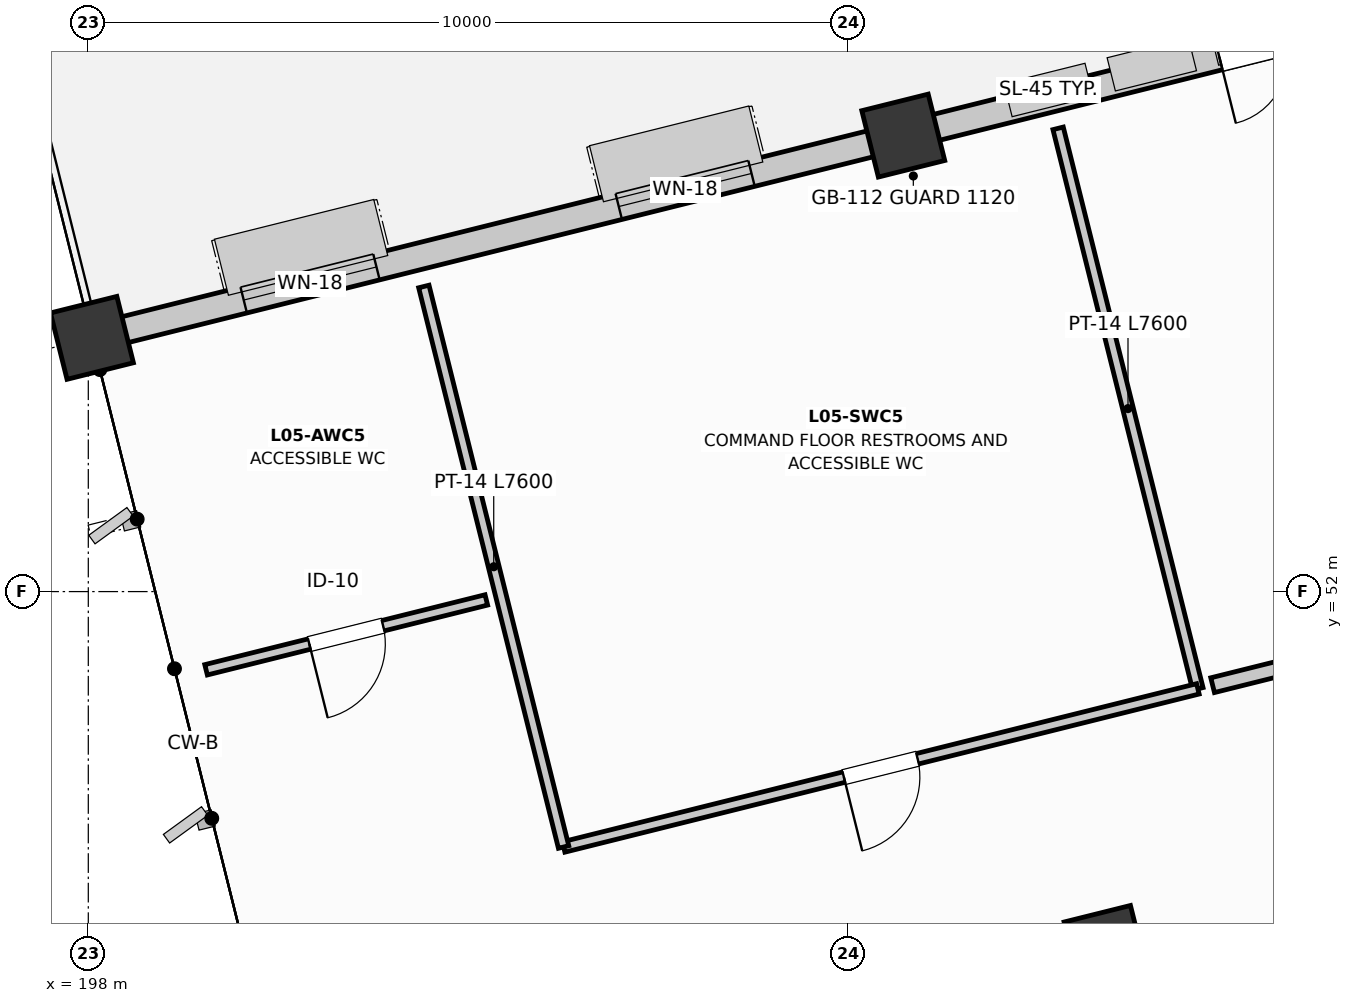
"""IFC4 building model, lengths in metres.
Left out: names, types, materials, properties, quantities, classifications, styles, units other than length and angle.
Written with IfcOpenShell. Run it as: python <this file> out.ifc"""

import sys

from ifc_helpers import new_model, si_unit, direction, frame, frame_2d, origin, origin_2d, place, context, subcontext, project, spatial, rectangle, extrude, element, fill, save


model = new_model("IFC4")
c1 = context("Model", 3, precision=1e-05, world=origin(), true_north=direction((0.0, 1.0)))
c2 = subcontext(c1, "Body", "Model", "MODEL_VIEW")
j1 = project(units=[si_unit("LENGTHUNIT", "METRE"), si_unit("PLANEANGLEUNIT", "RADIAN")], contexts=[c1])
p1 = place(None, origin())
s1 = spatial("IfcSite", under=j1, at=p1, CompositionType="ELEMENT")
p2 = place(p1, origin())
s2 = spatial("IfcBuilding", under=s1, at=p2, CompositionType="ELEMENT")
p3 = place(p2, frame((0.0, 0.0, 24.6)))
s3 = spatial("IfcBuildingStorey", under=s2, at=p3, CompositionType="ELEMENT", Elevation=24.6)
for number, where, z_axis, x_axis in (
    (1, (198.048, 55.338, 0.0), (0.0, 0.0, 1.0), (0.97, 0.242, 0.0)),
    (2, (211.383, 47.325, 0.0), (0.0, 0.0, 1.0), (0.97, 0.242, 0.0)),
    (3, (208.722, 57.999, 0.0), (0.0, 0.0, 1.0), (0.97, 0.242, 0.0)),
):
    element("IfcColumn", number, at=place(p3, frame(where, z_axis=z_axis, x_axis=x_axis)), inside=s3, PredefinedType="COLUMN", context=c2, shape_type="SweptSolid", body=[
        extrude(rectangle(XDim=0.9, YDim=0.9, at=origin_2d()), origin(), (0.0, 0.0, 1.0), 4.2),
    ])
p4 = place(p3, frame((219.089, 60.584, 0.0), z_axis=(0.0, 0.0, 1.0), x_axis=(-0.970295240562, -0.241923843686, 0.0)))
e4 = element("IfcWall", 4, at=p4, inside=s3, PredefinedType="STANDARD", context=c2, shape_type="SweptSolid", body=[
    extrude(rectangle(XDim=10.27, YDim=0.35, at=frame_2d((5.135, 0.0))), origin(), (0.0, 0.0, 1.0), 3.575),
])
p5 = place(p4, frame((4.6, 0.0, 0.0)))
e5 = element("IfcOpeningElement", 5, at=p5, cuts=e4, PredefinedType="OPENING", context=c2, shape_type="SweptSolid", body=[
    extrude(rectangle(XDim=1.8, YDim=2.3, at=frame_2d((0.9, 1.15))), frame((0.0, 0.185, 0.0), z_axis=(0.0, -1.0, 0.0), x_axis=(1.0, 0.0, 0.0)), (0.0, 0.0, 1.0), 0.37),
])
p6 = place(p3, frame((208.319, 57.898, 0.0), z_axis=(0.0, 0.0, 1.0), x_axis=(-0.970296149297, -0.241920198949, 0.0)))
e6 = element("IfcWall", 6, at=p6, inside=s3, PredefinedType="STANDARD", context=c2, shape_type="SweptSolid", body=[
    extrude(rectangle(XDim=10.171, YDim=0.35, at=frame_2d((5.085, 0.0))), origin(), (0.0, 0.0, 1.0), 3.575),
])
p7 = place(p6, frame((1.643, 0.0, 0.85)))
e7 = element("IfcOpeningElement", 7, at=p7, cuts=e6, PredefinedType="OPENING", context=c2, shape_type="SweptSolid", body=[
    extrude(rectangle(XDim=1.8, YDim=1.65, at=frame_2d((0.9, 0.825))), frame((0.0, 0.185, 0.0), z_axis=(0.0, -1.0, 0.0), x_axis=(1.0, 0.0, 0.0)), (0.0, 0.0, 1.0), 0.37),
])
p8 = place(p6, frame((6.728, 0.0, 0.85)))
e8 = element("IfcOpeningElement", 8, at=p8, cuts=e6, PredefinedType="OPENING", context=c2, shape_type="SweptSolid", body=[
    extrude(rectangle(XDim=1.8, YDim=1.65, at=frame_2d((0.9, 0.825))), frame((0.0, 0.185, 0.0), z_axis=(0.0, -1.0, 0.0), x_axis=(1.0, 0.0, 0.0)), (0.0, 0.0, 1.0), 0.37),
])
p9 = place(p3, frame((220.309, 48.727, 0.0), z_axis=(0.0, 0.0, 1.0), x_axis=(-0.970296544738, -0.241918612906, 0.0)))
e9 = element("IfcWall", 9, at=p9, inside=s3, PredefinedType="SHEAR", context=c2, shape_type="SweptSolid", body=[
    extrude(rectangle(XDim=17.2, YDim=0.4, at=frame_2d((8.6, 0.0))), origin(), (0.0, 0.0, 1.0), 3.98),
])
p10 = place(p9, frame((5.32, 0.0, 0.0)))
e10 = element("IfcOpeningElement", 10, at=p10, cuts=e9, PredefinedType="OPENING", context=c2, shape_type="SweptSolid", body=[
    extrude(rectangle(XDim=2.0, YDim=2.3, at=frame_2d((1.0, 1.15))), frame((0.0, 0.21, 0.0), z_axis=(0.0, -1.0, 0.0), x_axis=(1.0, 0.0, 0.0)), (0.0, 0.0, 1.0), 0.42),
])
p11 = place(p3, frame((210.759, 58.094, 0.0), z_axis=(0.0, 0.0, 1.0), x_axis=(0.241922569678, -0.970295558209, 0.0)))
e11 = element("IfcWall", 11, at=p11, inside=s3, PredefinedType="PARTITIONING", context=c2, shape_type="SweptSolid", body=[
    extrude(rectangle(XDim=7.6, YDim=0.14, at=frame_2d((3.8, 0.0))), origin(), (0.0, 0.0, 1.0), 3.98),
])
p12 = place(p3, frame((212.598, 50.72, 0.0), z_axis=(0.0, 0.0, 1.0), x_axis=(-0.970296884994, -0.241917248188, 0.0)))
e12 = element("IfcWall", 12, at=p12, inside=s3, PredefinedType="PARTITIONING", context=c2, shape_type="SweptSolid", body=[
    extrude(rectangle(XDim=8.6, YDim=0.14, at=frame_2d((4.3, 0.0))), origin(), (0.0, 0.0, 1.0), 3.225),
])
p13 = place(p12, frame((3.8, 0.0, 0.0)))
e13 = element("IfcOpeningElement", 13, at=p13, cuts=e12, PredefinedType="OPENING", context=c2, shape_type="SweptSolid", body=[
    extrude(rectangle(XDim=1.0, YDim=2.15, at=frame_2d((0.5, 1.075))), frame((0.0, 0.08, 0.0), z_axis=(0.0, -1.0, 0.0), x_axis=(1.0, 0.0, 0.0)), (0.0, 0.0, 1.0), 0.16),
])
p14 = place(p3, frame((204.253, 48.64, 0.0), z_axis=(0.0, 0.0, 1.0), x_axis=(-0.241922569678, 0.970295558209, 0.0)))
e14 = element("IfcWall", 14, at=p14, inside=s3, PredefinedType="PARTITIONING", context=c2, shape_type="SweptSolid", body=[
    extrude(rectangle(XDim=7.6, YDim=0.14, at=frame_2d((3.8, 0.0))), origin(), (0.0, 0.0, 1.0), 3.98),
])
p15 = place(p3, frame((220.748, 52.752, 0.0), z_axis=(0.0, 0.0, 1.0), x_axis=(-0.97029796636, -0.241912910937, 0.0)))
e15 = element("IfcWall", 15, at=p15, inside=s3, PredefinedType="PARTITIONING", context=c2, shape_type="SweptSolid", body=[
    extrude(rectangle(XDim=8.2, YDim=0.2, at=frame_2d((4.1, 0.0))), origin(), (0.0, 0.0, 1.0), 3.98),
])
p16 = place(p15, frame((3.55, 0.0, 0.0)))
e16 = element("IfcOpeningElement", 16, at=p16, cuts=e15, PredefinedType="OPENING", context=c2, shape_type="SweptSolid", body=[
    extrude(rectangle(XDim=1.1, YDim=2.2, at=frame_2d((0.55, 1.1))), frame((0.0, 0.11, 0.0), z_axis=(0.0, -1.0, 0.0), x_axis=(1.0, 0.0, 0.0)), (0.0, 0.0, 1.0), 0.22),
])
p17 = place(p3, frame((203.237, 51.89, 0.0), z_axis=(0.0, 0.0, 1.0), x_axis=(-0.970295558209, -0.241922569678, 0.0)))
e17 = element("IfcWall", 17, at=p17, inside=s3, PredefinedType="PARTITIONING", context=c2, shape_type="SweptSolid", body=[
    extrude(rectangle(XDim=3.8, YDim=0.14, at=frame_2d((1.9, 0.0))), origin(), (0.0, 0.0, 1.0), 3.98),
])
p18 = place(p17, frame((1.4, 0.0, 0.0)))
e18 = element("IfcOpeningElement", 18, at=p18, cuts=e17, PredefinedType="OPENING", context=c2, shape_type="SweptSolid", body=[
    extrude(rectangle(XDim=1.0, YDim=2.15, at=frame_2d((0.5, 1.075))), frame((0.0, 0.08, 0.0), z_axis=(0.0, -1.0, 0.0), x_axis=(1.0, 0.0, 0.0)), (0.0, 0.0, 1.0), 0.16),
])
p19 = place(p5, origin())
e19 = element("IfcDoor", 19, at=p19, inside=s3, OperationType="DOUBLE_DOOR_SINGLE_SWING", PredefinedType="DOOR", context=c2, shape_type="SweptSolid", body=[
    extrude(rectangle(XDim=1.8, YDim=2.3, at=frame_2d((0.9, 1.15))), frame((0.0, 0.025, 0.0), z_axis=(0.0, -1.0, 0.0), x_axis=(1.0, 0.0, 0.0)), (0.0, 0.0, 1.0), 0.05),
])
fill(e5, e19)
p20 = place(p7, origin())
e20 = element("IfcWindow", 20, at=p20, inside=s3, PartitioningType="SINGLE_PANEL", PredefinedType="WINDOW", context=c2, shape_type="SweptSolid", body=[
    extrude(rectangle(XDim=1.8, YDim=1.65, at=frame_2d((0.9, 0.825))), frame((0.0, 0.03, 0.0), z_axis=(0.0, -1.0, 0.0), x_axis=(1.0, 0.0, 0.0)), (0.0, 0.0, 1.0), 0.06),
])
fill(e7, e20)
p21 = place(p8, origin())
e21 = element("IfcWindow", 21, at=p21, inside=s3, PartitioningType="SINGLE_PANEL", PredefinedType="WINDOW", context=c2, shape_type="SweptSolid", body=[
    extrude(rectangle(XDim=1.8, YDim=1.65, at=frame_2d((0.9, 0.825))), frame((0.0, 0.03, 0.0), z_axis=(0.0, -1.0, 0.0), x_axis=(1.0, 0.0, 0.0)), (0.0, 0.0, 1.0), 0.06),
])
fill(e8, e21)
p22 = place(p13, origin())
e22 = element("IfcDoor", 22, at=p22, inside=s3, OperationType="SINGLE_SWING_RIGHT", PredefinedType="DOOR", context=c2, shape_type="SweptSolid", body=[
    extrude(rectangle(XDim=1.0, YDim=2.15, at=frame_2d((0.5, 1.075))), frame((0.0, 0.025, 0.0), z_axis=(0.0, -1.0, 0.0), x_axis=(1.0, 0.0, 0.0)), (0.0, 0.0, 1.0), 0.05),
])
fill(e13, e22)
p23 = place(p18, origin())
e23 = element("IfcDoor", 23, at=p23, inside=s3, OperationType="SINGLE_SWING_RIGHT", PredefinedType="DOOR", context=c2, shape_type="SweptSolid", body=[
    extrude(rectangle(XDim=1.0, YDim=2.15, at=frame_2d((0.5, 1.075))), frame((0.0, 0.025, 0.0), z_axis=(0.0, -1.0, 0.0), x_axis=(1.0, 0.0, 0.0)), (0.0, 0.0, 1.0), 0.05),
])
fill(e18, e23)
save(model, sys.argv[1])
